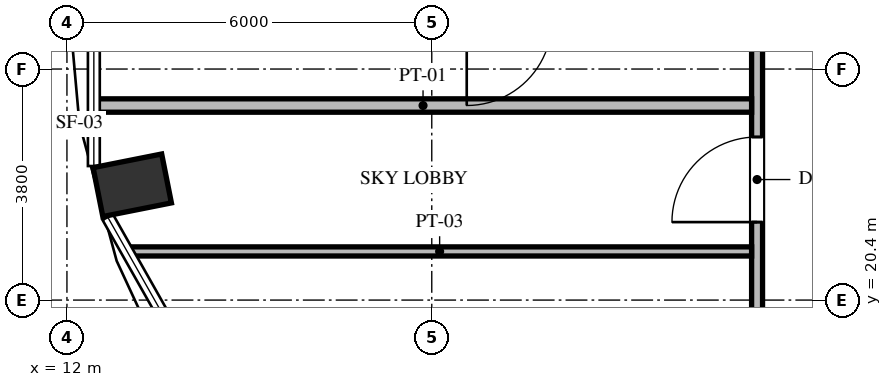
"""IFC4 building model, lengths in metres.
Left out: names, types, materials, properties, quantities, classifications, styles, units other than length and angle.
Written with IfcOpenShell. Run it as: python <this file> out.ifc"""

import sys

from ifc_helpers import new_model, si_unit, direction, frame, frame_2d, origin, origin_2d, place, context, subcontext, project, spatial, rectangle, extrude, element, fill, save


model = new_model("IFC4")
c1 = context("Model", 3, precision=1e-05, world=origin(), true_north=direction((0.0, 1.0)))
c2 = subcontext(c1, "Body", "Model", "MODEL_VIEW")
j1 = project(units=[si_unit("LENGTHUNIT", "METRE"), si_unit("PLANEANGLEUNIT", "RADIAN")], contexts=[c1])
p1 = place(None, origin())
s1 = spatial("IfcSite", under=j1, at=p1, CompositionType="ELEMENT")
p2 = place(p1, origin())
s2 = spatial("IfcBuilding", under=s1, at=p2, CompositionType="ELEMENT")
p3 = place(p2, frame((0.0, 0.0, 185.712)))
s3 = spatial("IfcBuildingStorey", under=s2, at=p3, CompositionType="ELEMENT", Elevation=185.712)
p4 = place(p3, frame((13.074, 22.288, 0.0), z_axis=(0.0, 0.0, 1.0), x_axis=(-0.980785280403, -0.195090322016, 0.0)))
e1 = element("IfcColumn", 1, at=p4, inside=s3, PredefinedType="COLUMN", context=c2, shape_type="SweptSolid", body=[
    extrude(rectangle(XDim=1.15, YDim=0.82, at=origin_2d()), origin(), (0.0, 0.0, 1.0), 3.648),
])
p5 = place(p3, frame((23.35, 19.98, 0.0), z_axis=(0.0, 0.0, 1.0), x_axis=(0.0, 1.0, 0.0)))
e2 = element("IfcWall", 2, at=p5, inside=s3, PredefinedType="PARTITIONING", context=c2, shape_type="SweptSolid", body=[
    extrude(rectangle(XDim=5.06, YDim=0.18, at=frame_2d((2.53, 0.0))), origin(), (0.0, 0.0, 1.0), 3.198),
])
p6 = place(p5, frame((1.702, 0.0, 0.0)))
e3 = element("IfcOpeningElement", 3, at=p6, cuts=e2, PredefinedType="OPENING", context=c2, shape_type="SweptSolid", body=[
    extrude(rectangle(XDim=1.4, YDim=2.2, at=frame_2d((0.7, 1.1))), frame((0.0, 0.1, 0.0), z_axis=(0.0, -1.0, 0.0), x_axis=(1.0, 0.0, 0.0)), (0.0, 0.0, 1.0), 0.2),
])
p7 = place(p3, frame((12.999, 21.2, 0.0), z_axis=(0.0, 0.0, 1.0), x_axis=(1.0, 0.0, 0.0)))
e4 = element("IfcWall", 4, at=p7, inside=s3, PredefinedType="PARTITIONING", context=c2, shape_type="SweptSolid", body=[
    extrude(rectangle(XDim=10.261, YDim=0.15, at=frame_2d((5.131, 0.0))), origin(), (0.0, 0.0, 1.0), 2.633),
])
p8 = place(p3, frame((12.453, 23.6, 0.0), z_axis=(0.0, 0.0, 1.0), x_axis=(1.0, 0.0, 0.0)))
e5 = element("IfcWall", 5, at=p8, inside=s3, PredefinedType="PARTITIONING", context=c2, shape_type="SweptSolid", body=[
    extrude(rectangle(XDim=10.807, YDim=0.22, at=frame_2d((5.404, 0.0))), origin(), (0.0, 0.0, 1.0), 3.198),
])
p9 = place(p6, origin())
e6 = element("IfcDoor", 6, at=p9, inside=s3, OperationType="SINGLE_SWING_LEFT", PredefinedType="DOOR", context=c2, shape_type="SweptSolid", body=[
    extrude(rectangle(XDim=1.4, YDim=2.2, at=frame_2d((0.7, 1.1))), frame((0.0, 0.025, 0.0), z_axis=(0.0, -1.0, 0.0), x_axis=(1.0, 0.0, 0.0)), (0.0, 0.0, 1.0), 0.05),
])
fill(e3, e6)
save(model, sys.argv[1])
